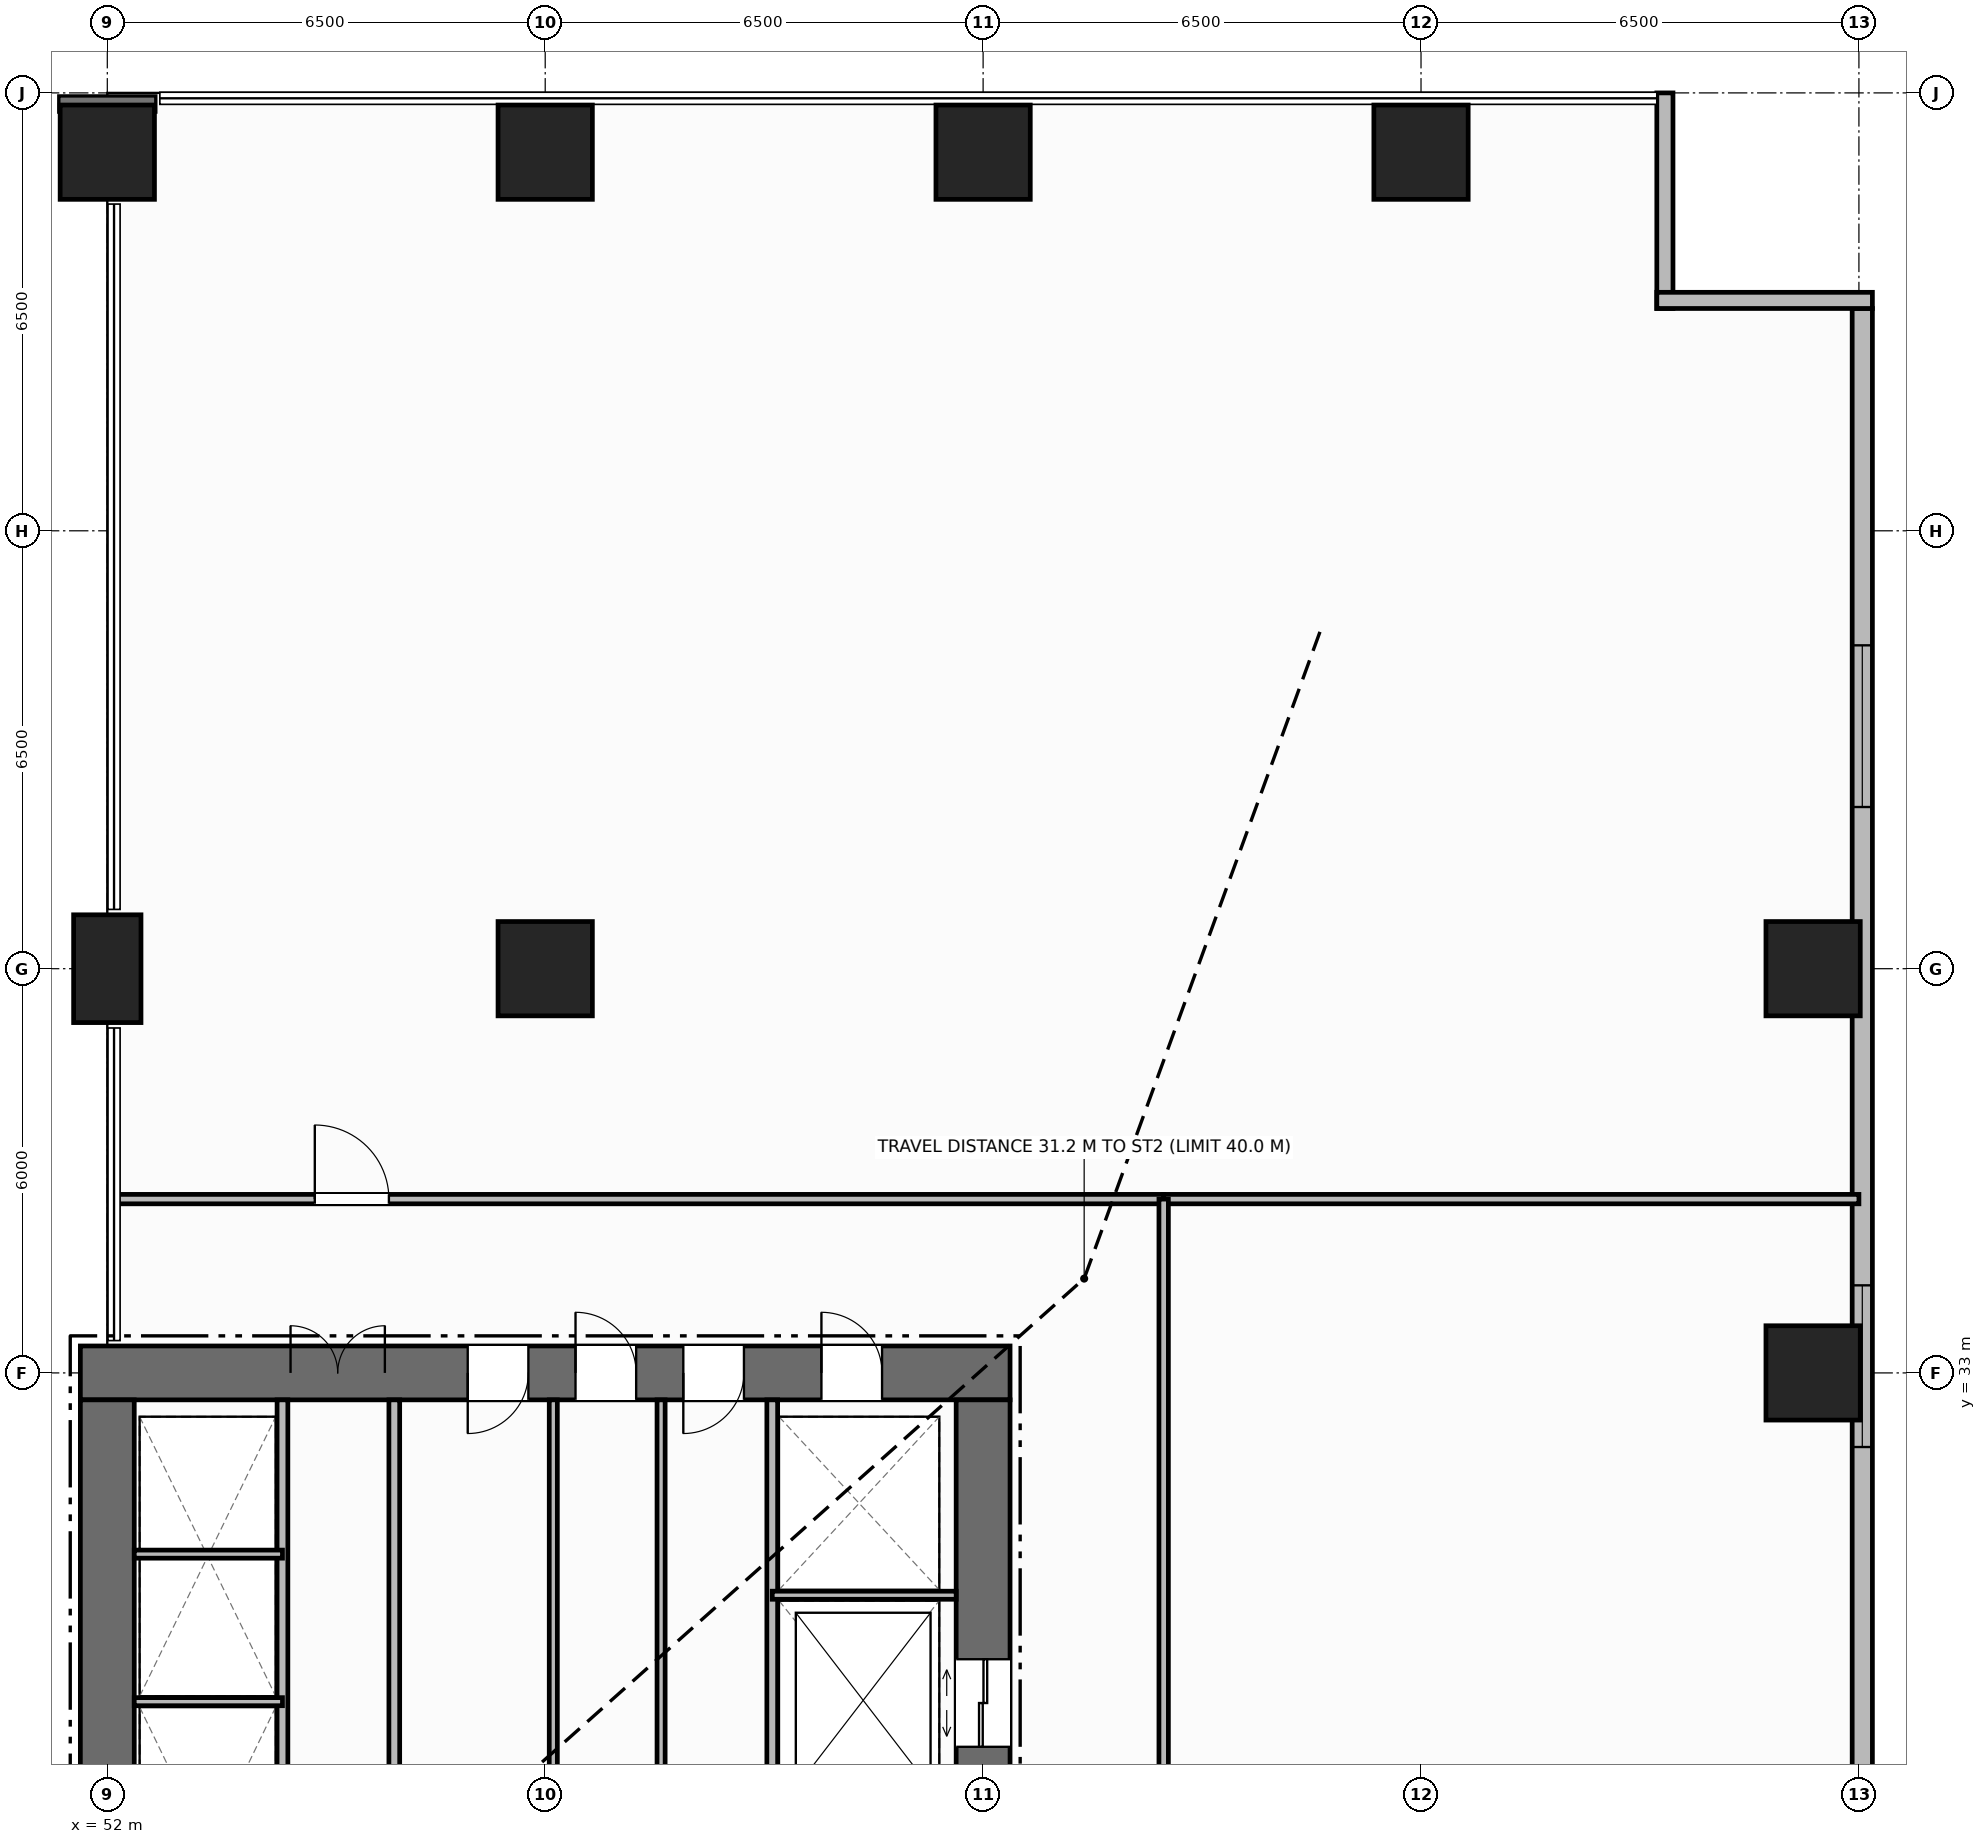
"""IFC4 building model, lengths in metres.
Left out: names, types, materials, properties, quantities, classifications, styles, units other than length and angle.
Written with IfcOpenShell. Run it as: python <this file> out.ifc"""

import sys

from ifc_helpers import new_model, si_unit, direction, frame, frame_2d, origin, origin_2d, place, context, subcontext, project, spatial, rectangle, extrude, element, fill, save


model = new_model("IFC4")
c1 = context("Model", 3, precision=1e-05, world=origin(), true_north=direction((0.0, 1.0)))
c2 = subcontext(c1, "Body", "Model", "MODEL_VIEW")
j1 = project(units=[si_unit("LENGTHUNIT", "METRE"), si_unit("PLANEANGLEUNIT", "RADIAN")], contexts=[c1])
p1 = place(None, origin())
s1 = spatial("IfcSite", under=j1, at=p1, CompositionType="ELEMENT")
p2 = place(p1, origin())
s2 = spatial("IfcBuilding", under=s1, at=p2, CompositionType="ELEMENT")
p3 = place(p2, frame((0.0, 0.0, 11.5)))
s3 = spatial("IfcBuildingStorey", under=s2, at=p3, CompositionType="ELEMENT", Elevation=11.5)
p4 = place(p3, frame((51.6, 33.0, 0.0), z_axis=(0.0, 0.0, 1.0), x_axis=(1.0, 0.0, 0.0)))
e1 = element("IfcWall", 1, at=p4, inside=s3, PredefinedType="SHEAR", context=c2, shape_type="SweptSolid", body=[
    extrude(rectangle(XDim=13.8, YDim=0.8, at=frame_2d((6.9, 0.0))), origin(), (0.0, 0.0, 1.0), 5.5),
])
p5 = place(p4, frame((3.12, 0.0, 0.0)))
e2 = element("IfcOpeningElement", 2, at=p5, cuts=e1, PredefinedType="OPENING", context=c2, shape_type="SweptSolid", body=[
    extrude(rectangle(XDim=1.4, YDim=2.2, at=frame_2d((0.7, 1.1))), frame((0.0, 0.41, 0.0), z_axis=(0.0, -1.0, 0.0), x_axis=(1.0, 0.0, 0.0)), (0.0, 0.0, 1.0), 0.82),
])
p6 = place(p4, frame((11.0, 0.0, 0.0)))
e3 = element("IfcOpeningElement", 3, at=p6, cuts=e1, PredefinedType="OPENING", context=c2, shape_type="SweptSolid", body=[
    extrude(rectangle(XDim=0.9, YDim=2.15, at=frame_2d((0.45, 1.075))), frame((0.0, 0.41, 0.0), z_axis=(0.0, -1.0, 0.0), x_axis=(1.0, 0.0, 0.0)), (0.0, 0.0, 1.0), 0.82),
])
p7 = place(p4, frame((5.75, 0.0, 0.0)))
e4 = element("IfcOpeningElement", 4, at=p7, cuts=e1, PredefinedType="OPENING", context=c2, shape_type="SweptSolid", body=[
    extrude(rectangle(XDim=0.9, YDim=2.15, at=frame_2d((0.45, 1.075))), frame((0.0, 0.41, 0.0), z_axis=(0.0, -1.0, 0.0), x_axis=(1.0, 0.0, 0.0)), (0.0, 0.0, 1.0), 0.82),
])
p8 = place(p4, frame((7.35, 0.0, 0.0)))
e5 = element("IfcOpeningElement", 5, at=p8, cuts=e1, PredefinedType="OPENING", context=c2, shape_type="SweptSolid", body=[
    extrude(rectangle(XDim=0.9, YDim=2.15, at=frame_2d((0.45, 1.075))), frame((0.0, 0.41, 0.0), z_axis=(0.0, -1.0, 0.0), x_axis=(1.0, 0.0, 0.0)), (0.0, 0.0, 1.0), 0.82),
])
p9 = place(p4, frame((8.95, 0.0, 0.0)))
e6 = element("IfcOpeningElement", 6, at=p9, cuts=e1, PredefinedType="OPENING", context=c2, shape_type="SweptSolid", body=[
    extrude(rectangle(XDim=0.9, YDim=2.15, at=frame_2d((0.45, 1.075))), frame((0.0, 0.41, 0.0), z_axis=(0.0, -1.0, 0.0), x_axis=(1.0, 0.0, 0.0)), (0.0, 0.0, 1.0), 0.82),
])
p10 = place(p3, frame((52.0, 19.4, 0.0), z_axis=(0.0, 0.0, 1.0), x_axis=(0.0, 1.0, 0.0)))
e7 = element("IfcWall", 7, at=p10, inside=s3, PredefinedType="SHEAR", context=c2, shape_type="SweptSolid", body=[
    extrude(rectangle(XDim=13.2, YDim=0.8, at=frame_2d((6.6, 0.0))), origin(), (0.0, 0.0, 1.0), 5.5),
])
p11 = place(p3, frame((65.0, 19.4, 0.0), z_axis=(0.0, 0.0, 1.0), x_axis=(0.0, 1.0, 0.0)))
e8 = element("IfcWall", 8, at=p11, inside=s3, PredefinedType="SHEAR", context=c2, shape_type="SweptSolid", body=[
    extrude(rectangle(XDim=13.2, YDim=0.8, at=frame_2d((6.6, 0.0))), origin(), (0.0, 0.0, 1.0), 5.5),
])
p12 = place(p11, frame((8.05, 0.0, 0.0)))
e9 = element("IfcOpeningElement", 9, at=p12, cuts=e8, PredefinedType="OPENING", context=c2, shape_type="SweptSolid", body=[
    extrude(rectangle(XDim=1.3, YDim=2.2, at=frame_2d((0.65, 1.1))), frame((0.0, 0.41, 0.0), z_axis=(0.0, -1.0, 0.0), x_axis=(1.0, 0.0, 0.0)), (0.0, 0.0, 1.0), 0.82),
])
p13 = place(p3, frame((58.5, 39.0, 0.0), z_axis=(0.0, 0.0, 1.0), x_axis=(1.0, 0.0, 0.0)))
e10 = element("IfcColumn", 10, at=p13, inside=s3, PredefinedType="COLUMN", context=c2, shape_type="SweptSolid", body=[
    extrude(rectangle(XDim=1.4, YDim=1.4, at=origin_2d()), origin(), (0.0, 0.0, 1.0), 5.5),
])
p14 = place(p3, frame((52.0, 39.0, 0.0), z_axis=(0.0, 0.0, 1.0), x_axis=(1.0, 0.0, 0.0)))
e11 = element("IfcColumn", 11, at=p14, inside=s3, PredefinedType="PILASTER", context=c2, shape_type="SweptSolid", body=[
    extrude(rectangle(XDim=1.0, YDim=1.6, at=origin_2d()), origin(), (0.0, 0.0, 1.0), 5.5),
])
for number, where, z_axis, x_axis in (
    (12, (52.0, 51.12, 0.0), (0.0, 0.0, 1.0), (1.0, 0.0, 0.0)),
    (13, (58.5, 51.12, 0.0), (0.0, 0.0, 1.0), (1.0, 0.0, 0.0)),
    (14, (65.0, 51.12, 0.0), (0.0, 0.0, 1.0), (1.0, 0.0, 0.0)),
    (15, (71.5, 51.12, 0.0), (0.0, 0.0, 1.0), (1.0, 0.0, 0.0)),
    (16, (77.32, 33.0, 0.0), (0.0, 0.0, 1.0), (1.0, 0.0, 0.0)),
    (17, (77.32, 39.0, 0.0), (0.0, 0.0, 1.0), (1.0, 0.0, 0.0)),
):
    element("IfcColumn", number, at=place(p3, frame(where, z_axis=z_axis, x_axis=x_axis)), inside=s3, PredefinedType="COLUMN", context=c2, shape_type="SweptSolid", body=[
        extrude(rectangle(XDim=1.4, YDim=1.4, at=origin_2d()), origin(), (0.0, 0.0, 1.0), 5.5),
    ])
p15 = place(p3, frame((78.05, 48.8, 0.0), z_axis=(0.0, 0.0, 1.0), x_axis=(0.0, -1.0, 0.0)))
e18 = element("IfcWall", 18, at=p15, inside=s3, PredefinedType="STANDARD", context=c2, shape_type="SweptSolid", body=[
    extrude(rectangle(XDim=45.6, YDim=0.3, at=frame_2d((22.8, 0.0))), origin(), (0.0, 0.0, 1.0), 5.22),
])
p16 = place(p15, frame((5.0, 0.0, 0.9)))
e19 = element("IfcOpeningElement", 19, at=p16, cuts=e18, PredefinedType="OPENING", context=c2, shape_type="SweptSolid", body=[
    extrude(rectangle(XDim=2.4, YDim=2.2, at=frame_2d((1.2, 1.1))), frame((0.0, 0.16, 0.0), z_axis=(0.0, -1.0, 0.0), x_axis=(1.0, 0.0, 0.0)), (0.0, 0.0, 1.0), 0.32),
])
p17 = place(p15, frame((14.5, 0.0, 0.9)))
e20 = element("IfcOpeningElement", 20, at=p17, cuts=e18, PredefinedType="OPENING", context=c2, shape_type="SweptSolid", body=[
    extrude(rectangle(XDim=2.4, YDim=2.2, at=frame_2d((1.2, 1.1))), frame((0.0, 0.16, 0.0), z_axis=(0.0, -1.0, 0.0), x_axis=(1.0, 0.0, 0.0)), (0.0, 0.0, 1.0), 0.32),
])
p18 = place(p15, frame((25.5, 0.0, 0.9)))
e21 = element("IfcOpeningElement", 21, at=p18, cuts=e18, PredefinedType="OPENING", context=c2, shape_type="SweptSolid", body=[
    extrude(rectangle(XDim=2.4, YDim=2.2, at=frame_2d((1.2, 1.1))), frame((0.0, 0.16, 0.0), z_axis=(0.0, -1.0, 0.0), x_axis=(1.0, 0.0, 0.0)), (0.0, 0.0, 1.0), 0.32),
])
p19 = place(p15, frame((35.0, 0.0, 0.9)))
e22 = element("IfcOpeningElement", 22, at=p19, cuts=e18, PredefinedType="OPENING", context=c2, shape_type="SweptSolid", body=[
    extrude(rectangle(XDim=2.4, YDim=2.2, at=frame_2d((1.2, 1.1))), frame((0.0, 0.16, 0.0), z_axis=(0.0, -1.0, 0.0), x_axis=(1.0, 0.0, 0.0)), (0.0, 0.0, 1.0), 0.32),
])
for number, where, z_axis, x_axis in (
    (23, (75.12, 52.0, 0.0), (0.0, 0.0, 1.0), (0.0, -1.0, 0.0)),
    (24, (75.0, 48.92, 0.0), (0.0, 0.0, 1.0), (1.0, 0.0, 0.0)),
):
    element("IfcWall", number, at=place(p3, frame(where, z_axis=z_axis, x_axis=x_axis)), inside=s3, PredefinedType="STANDARD", context=c2, shape_type="SweptSolid", body=[
        extrude(rectangle(XDim=3.2, YDim=0.24, at=frame_2d((1.6, 0.0))), origin(), (0.0, 0.0, 1.0), 5.22),
    ])
p20 = place(p3, frame((54.6, 19.4, 0.0), z_axis=(0.0, 0.0, 1.0), x_axis=(0.0, 1.0, 0.0)))
e25 = element("IfcWall", 25, at=p20, inside=s3, PredefinedType="STANDARD", context=c2, shape_type="SweptSolid", body=[
    extrude(rectangle(XDim=13.2, YDim=0.16, at=frame_2d((6.6, 0.0))), origin(), (0.0, 0.0, 1.0), 5.22),
])
p21 = place(p20, frame((0.55, 0.0, 0.0)))
e26 = element("IfcOpeningElement", 26, at=p21, cuts=e25, PredefinedType="OPENING", context=c2, shape_type="SweptSolid", body=[
    extrude(rectangle(XDim=1.1, YDim=2.2, at=frame_2d((0.55, 1.1))), frame((0.0, 0.09, 0.0), z_axis=(0.0, -1.0, 0.0), x_axis=(1.0, 0.0, 0.0)), (0.0, 0.0, 1.0), 0.18),
])
p22 = place(p20, frame((2.7, 0.0, 0.0)))
e27 = element("IfcOpeningElement", 27, at=p22, cuts=e25, PredefinedType="OPENING", context=c2, shape_type="SweptSolid", body=[
    extrude(rectangle(XDim=1.1, YDim=2.2, at=frame_2d((0.55, 1.1))), frame((0.0, 0.09, 0.0), z_axis=(0.0, -1.0, 0.0), x_axis=(1.0, 0.0, 0.0)), (0.0, 0.0, 1.0), 0.18),
])
p23 = place(p3, frame((56.26, 23.09, 0.0), z_axis=(0.0, 0.0, 1.0), x_axis=(0.0, 1.0, 0.0)))
e28 = element("IfcWall", 28, at=p23, inside=s3, PredefinedType="STANDARD", context=c2, shape_type="SweptSolid", body=[
    extrude(rectangle(XDim=9.51, YDim=0.16, at=frame_2d((4.755, 0.0))), origin(), (0.0, 0.0, 1.0), 5.22),
])
p24 = place(p23, frame((1.01, 0.0, 0.0)))
e29 = element("IfcOpeningElement", 29, at=p24, cuts=e28, PredefinedType="OPENING", context=c2, shape_type="SweptSolid", body=[
    extrude(rectangle(XDim=1.3, YDim=2.2, at=frame_2d((0.65, 1.1))), frame((0.0, 0.09, 0.0), z_axis=(0.0, -1.0, 0.0), x_axis=(1.0, 0.0, 0.0)), (0.0, 0.0, 1.0), 0.18),
])
for number, where, z_axis, x_axis in (
    (30, (52.4, 28.12, 0.0), (0.0, 0.0, 1.0), (1.0, 0.0, 0.0)),
    (31, (52.4, 30.31, 0.0), (0.0, 0.0, 1.0), (1.0, 0.0, 0.0)),
):
    element("IfcWall", number, at=place(p3, frame(where, z_axis=z_axis, x_axis=x_axis)), inside=s3, PredefinedType="PARTITIONING", context=c2, shape_type="SweptSolid", body=[
        extrude(rectangle(XDim=2.2, YDim=0.12, at=frame_2d((1.1, 0.0))), origin(), (0.0, 0.0, 1.0), 5.22),
    ])
p25 = place(p3, frame((61.87, 26.56, 0.0), z_axis=(0.0, 0.0, 1.0), x_axis=(0.0, 1.0, 0.0)))
e32 = element("IfcWall", 32, at=p25, inside=s3, PredefinedType="STANDARD", context=c2, shape_type="SweptSolid", body=[
    extrude(rectangle(XDim=6.04, YDim=0.16, at=frame_2d((3.02, 0.0))), origin(), (0.0, 0.0, 1.0), 5.22),
])
p26 = place(p3, frame((61.87, 29.7, 0.0), z_axis=(0.0, 0.0, 1.0), x_axis=(1.0, 0.0, 0.0)))
e33 = element("IfcWall", 33, at=p26, inside=s3, PredefinedType="PARTITIONING", context=c2, shape_type="SweptSolid", body=[
    extrude(rectangle(XDim=2.73, YDim=0.12, at=frame_2d((1.365, 0.0))), origin(), (0.0, 0.0, 1.0), 5.22),
])
for number, where, z_axis, x_axis in (
    (34, (58.62, 26.56, 0.0), (0.0, 0.0, 1.0), (0.0, 1.0, 0.0)),
    (35, (60.22, 26.56, 0.0), (0.0, 0.0, 1.0), (0.0, 1.0, 0.0)),
):
    element("IfcWall", number, at=place(p3, frame(where, z_axis=z_axis, x_axis=x_axis)), inside=s3, PredefinedType="PARTITIONING", context=c2, shape_type="SweptSolid", body=[
        extrude(rectangle(XDim=6.04, YDim=0.12, at=frame_2d((3.02, 0.0))), origin(), (0.0, 0.0, 1.0), 5.22),
    ])
p27 = place(p3, frame((67.68, 35.58, 0.0), z_axis=(0.0, 0.0, 1.0), x_axis=(1.0, 0.0, 0.0)))
e36 = element("IfcWall", 36, at=p27, inside=s3, PredefinedType="PARTITIONING", context=c2, shape_type="SweptSolid", body=[
    extrude(rectangle(XDim=10.32, YDim=0.14, at=frame_2d((5.16, 0.0))), origin(), (0.0, 0.0, 1.0), 5.22),
])
p28 = place(p3, frame((52.08, 35.58, 0.0), z_axis=(0.0, 0.0, 1.0), x_axis=(1.0, 0.0, 0.0)))
e37 = element("IfcWall", 37, at=p28, inside=s3, PredefinedType="PARTITIONING", context=c2, shape_type="SweptSolid", body=[
    extrude(rectangle(XDim=15.6, YDim=0.14, at=frame_2d((7.8, 0.0))), origin(), (0.0, 0.0, 1.0), 5.22),
])
p29 = place(p28, frame((3.0, 0.0, 0.0)))
e38 = element("IfcOpeningElement", 38, at=p29, cuts=e37, PredefinedType="OPENING", context=c2, shape_type="SweptSolid", body=[
    extrude(rectangle(XDim=1.1, YDim=2.15, at=frame_2d((0.55, 1.075))), frame((0.0, 0.08, 0.0), z_axis=(0.0, -1.0, 0.0), x_axis=(1.0, 0.0, 0.0)), (0.0, 0.0, 1.0), 0.16),
])
p30 = place(p3, frame((67.68, 12.45, 0.0), z_axis=(0.0, 0.0, 1.0), x_axis=(0.0, 1.0, 0.0)))
e39 = element("IfcWall", 39, at=p30, inside=s3, PredefinedType="PARTITIONING", context=c2, shape_type="SweptSolid", body=[
    extrude(rectangle(XDim=23.13, YDim=0.14, at=frame_2d((11.565, 0.0))), origin(), (0.0, 0.0, 1.0), 5.22),
])
p31 = place(p30, frame((5.0, 0.0, 0.0)))
e40 = element("IfcOpeningElement", 40, at=p31, cuts=e39, PredefinedType="OPENING", context=c2, shape_type="SweptSolid", body=[
    extrude(rectangle(XDim=1.1, YDim=2.15, at=frame_2d((0.55, 1.075))), frame((0.0, 0.08, 0.0), z_axis=(0.0, -1.0, 0.0), x_axis=(1.0, 0.0, 0.0)), (0.0, 0.0, 1.0), 0.16),
])
p32 = place(p16, origin())
e41 = element("IfcWindow", 41, at=p32, inside=s3, PartitioningType="SINGLE_PANEL", PredefinedType="WINDOW", context=c2, shape_type="SweptSolid", body=[
    extrude(rectangle(XDim=2.4, YDim=2.2, at=frame_2d((1.2, 1.1))), frame((0.0, 0.03, 0.0), z_axis=(0.0, -1.0, 0.0), x_axis=(1.0, 0.0, 0.0)), (0.0, 0.0, 1.0), 0.06),
])
fill(e19, e41)
p33 = place(p17, origin())
e42 = element("IfcWindow", 42, at=p33, inside=s3, PartitioningType="SINGLE_PANEL", PredefinedType="WINDOW", context=c2, shape_type="SweptSolid", body=[
    extrude(rectangle(XDim=2.4, YDim=2.2, at=frame_2d((1.2, 1.1))), frame((0.0, 0.03, 0.0), z_axis=(0.0, -1.0, 0.0), x_axis=(1.0, 0.0, 0.0)), (0.0, 0.0, 1.0), 0.06),
])
fill(e20, e42)
p34 = place(p5, origin())
e43 = element("IfcDoor", 43, at=p34, inside=s3, OperationType="DOUBLE_DOOR_SINGLE_SWING", PredefinedType="DOOR", context=c2, shape_type="SweptSolid", body=[
    extrude(rectangle(XDim=1.4, YDim=2.2, at=frame_2d((0.7, 1.1))), frame((0.0, -0.075, 0.0), z_axis=(0.0, -1.0, 0.0), x_axis=(1.0, 0.0, 0.0)), (0.0, 0.0, 1.0), 0.05),
])
fill(e2, e43)
p35 = place(p12, origin())
e44 = element("IfcDoor", 44, at=p35, inside=s3, OperationType="DOUBLE_DOOR_SLIDING", PredefinedType="DOOR", context=c2, shape_type="SweptSolid", body=[
    extrude(rectangle(XDim=1.3, YDim=2.2, at=frame_2d((0.65, 1.1))), frame((0.0, 0.025, 0.0), z_axis=(0.0, -1.0, 0.0), x_axis=(1.0, 0.0, 0.0)), (0.0, 0.0, 1.0), 0.05),
])
fill(e9, e44)
p36 = place(p6, origin())
e45 = element("IfcDoor", 45, at=p36, inside=s3, OperationType="SINGLE_SWING_LEFT", PredefinedType="DOOR", context=c2, shape_type="SweptSolid", body=[
    extrude(rectangle(XDim=0.9, YDim=2.15, at=frame_2d((0.45, 1.075))), frame((0.0, -0.075, 0.0), z_axis=(0.0, -1.0, 0.0), x_axis=(1.0, 0.0, 0.0)), (0.0, 0.0, 1.0), 0.05),
])
fill(e3, e45)
p37 = place(p7, origin())
e46 = element("IfcDoor", 46, at=p37, inside=s3, OperationType="SINGLE_SWING_RIGHT", PredefinedType="DOOR", context=c2, shape_type="SweptSolid", body=[
    extrude(rectangle(XDim=0.9, YDim=2.15, at=frame_2d((0.45, 1.075))), frame((0.0, -0.075, 0.0), z_axis=(0.0, -1.0, 0.0), x_axis=(1.0, 0.0, 0.0)), (0.0, 0.0, 1.0), 0.05),
])
fill(e4, e46)
p38 = place(p8, origin())
e47 = element("IfcDoor", 47, at=p38, inside=s3, OperationType="SINGLE_SWING_LEFT", PredefinedType="DOOR", context=c2, shape_type="SweptSolid", body=[
    extrude(rectangle(XDim=0.9, YDim=2.15, at=frame_2d((0.45, 1.075))), frame((0.0, -0.075, 0.0), z_axis=(0.0, -1.0, 0.0), x_axis=(1.0, 0.0, 0.0)), (0.0, 0.0, 1.0), 0.05),
])
fill(e5, e47)
p39 = place(p9, origin())
e48 = element("IfcDoor", 48, at=p39, inside=s3, OperationType="SINGLE_SWING_RIGHT", PredefinedType="DOOR", context=c2, shape_type="SweptSolid", body=[
    extrude(rectangle(XDim=0.9, YDim=2.15, at=frame_2d((0.45, 1.075))), frame((0.0, -0.075, 0.0), z_axis=(0.0, -1.0, 0.0), x_axis=(1.0, 0.0, 0.0)), (0.0, 0.0, 1.0), 0.05),
])
fill(e6, e48)
p40 = place(p29, origin())
e49 = element("IfcDoor", 49, at=p40, inside=s3, OperationType="SINGLE_SWING_LEFT", PredefinedType="DOOR", context=c2, shape_type="SweptSolid", body=[
    extrude(rectangle(XDim=1.1, YDim=2.15, at=frame_2d((0.55, 1.075))), frame((0.0, 0.025, 0.0), z_axis=(0.0, -1.0, 0.0), x_axis=(1.0, 0.0, 0.0)), (0.0, 0.0, 1.0), 0.05),
])
fill(e38, e49)
save(model, sys.argv[1])
